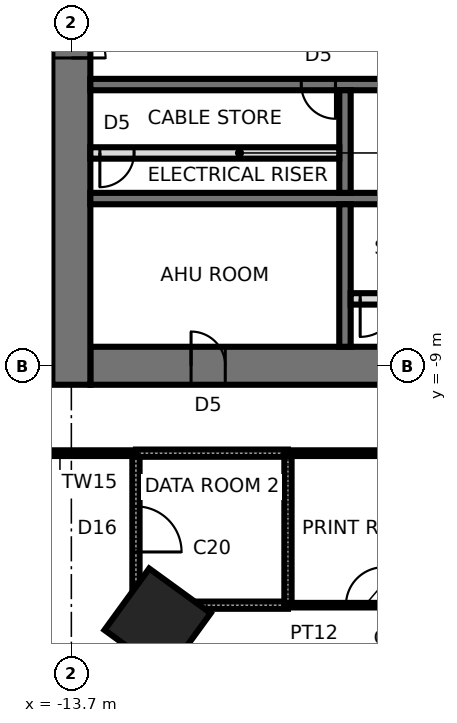
"""IFC4 building model, lengths in metres.
Left out: names, types, materials, properties, quantities, classifications, styles, units other than length and angle.
Written with IfcOpenShell. Run it as: python <this file> out.ifc"""

import sys

from ifc_helpers import new_model, si_unit, direction, frame, frame_2d, origin, origin_2d, place, context, subcontext, project, spatial, rectangle, extrude, element, fill, save


model = new_model("IFC4")
c1 = context("Model", 3, precision=1e-05, world=origin(), true_north=direction((0.0, 1.0)))
c2 = subcontext(c1, "Body", "Model", "MODEL_VIEW")
j1 = project(units=[si_unit("LENGTHUNIT", "METRE"), si_unit("PLANEANGLEUNIT", "RADIAN")], contexts=[c1])
p1 = place(None, origin())
s1 = spatial("IfcSite", under=j1, at=p1, CompositionType="ELEMENT")
p2 = place(p1, origin())
s2 = spatial("IfcBuilding", under=s1, at=p2, CompositionType="ELEMENT")
p3 = place(p2, frame((0.0, 0.0, 32.2)))
s3 = spatial("IfcBuildingStorey", under=s2, at=p3, CompositionType="ELEMENT", Elevation=32.2)
p4 = place(p3, frame((-11.43, -15.733, 0.0), z_axis=(0.0, 0.0, 1.0), x_axis=(-0.587785252292, -0.809016994375, 0.0)))
e1 = element("IfcColumn", 1, at=p4, inside=s3, PredefinedType="COLUMN", context=c2, shape_type="SweptSolid", body=[
    extrude(rectangle(XDim=2.0, YDim=2.0, at=origin_2d()), origin(), (0.0, 0.0, 1.0), 4.2),
])
p5 = place(p3, frame((-13.2, -9.0, 0.0), z_axis=(0.0, 0.0, 1.0), x_axis=(1.0, 0.0, 0.0)))
e2 = element("IfcWall", 2, at=p5, inside=s3, PredefinedType="SHEAR", context=c2, shape_type="SweptSolid", body=[
    extrude(rectangle(XDim=26.4, YDim=1.0, at=frame_2d((13.2, 0.0))), origin(), (0.0, 0.0, 1.0), 4.2),
])
p6 = place(p5, frame((2.65, 0.0, 0.0)))
e3 = element("IfcOpeningElement", 3, at=p6, cuts=e2, PredefinedType="OPENING", context=c2, shape_type="SweptSolid", body=[
    extrude(rectangle(XDim=0.9, YDim=2.1, at=frame_2d((0.45, 1.05))), frame((0.0, 0.51, 0.0), z_axis=(0.0, -1.0, 0.0), x_axis=(1.0, 0.0, 0.0)), (0.0, 0.0, 1.0), 1.02),
])
p7 = place(p5, frame((9.5, 0.0, 0.0)))
e4 = element("IfcOpeningElement", 4, at=p7, cuts=e2, PredefinedType="OPENING", context=c2, shape_type="SweptSolid", body=[
    extrude(rectangle(XDim=0.9, YDim=2.1, at=frame_2d((0.45, 1.05))), frame((0.0, 0.51, 0.0), z_axis=(0.0, -1.0, 0.0), x_axis=(1.0, 0.0, 0.0)), (0.0, 0.0, 1.0), 1.02),
])
p8 = place(p5, frame((16.0, 0.0, 0.0)))
e5 = element("IfcOpeningElement", 5, at=p8, cuts=e2, PredefinedType="OPENING", context=c2, shape_type="SweptSolid", body=[
    extrude(rectangle(XDim=0.9, YDim=2.1, at=frame_2d((0.45, 1.05))), frame((0.0, 0.51, 0.0), z_axis=(0.0, -1.0, 0.0), x_axis=(1.0, 0.0, 0.0)), (0.0, 0.0, 1.0), 1.02),
])
p9 = place(p5, frame((22.85, 0.0, 0.0)))
e6 = element("IfcOpeningElement", 6, at=p9, cuts=e2, PredefinedType="OPENING", context=c2, shape_type="SweptSolid", body=[
    extrude(rectangle(XDim=0.9, YDim=2.1, at=frame_2d((0.45, 1.05))), frame((0.0, 0.51, 0.0), z_axis=(0.0, -1.0, 0.0), x_axis=(1.0, 0.0, 0.0)), (0.0, 0.0, 1.0), 1.02),
])
p10 = place(p3, frame((-13.7, 9.5, 0.0), z_axis=(0.0, 0.0, 1.0), x_axis=(0.0, -1.0, 0.0)))
e7 = element("IfcWall", 7, at=p10, inside=s3, PredefinedType="SHEAR", context=c2, shape_type="SweptSolid", body=[
    extrude(rectangle(XDim=19.0, YDim=1.0, at=frame_2d((9.5, 0.0))), origin(), (0.0, 0.0, 1.0), 4.2),
])
p11 = place(p10, frame((8.6, 0.0, 0.0)))
e8 = element("IfcOpeningElement", 8, at=p11, cuts=e7, PredefinedType="OPENING", context=c2, shape_type="SweptSolid", body=[
    extrude(rectangle(XDim=1.8, YDim=2.4, at=frame_2d((0.9, 1.2))), frame((0.0, 0.51, 0.0), z_axis=(0.0, -1.0, 0.0), x_axis=(1.0, 0.0, 0.0)), (0.0, 0.0, 1.0), 1.02),
])
p12 = place(p3, frame((-13.2, -1.6, 0.0), z_axis=(0.0, 0.0, 1.0), x_axis=(1.0, 0.0, 0.0)))
e9 = element("IfcWall", 9, at=p12, inside=s3, PredefinedType="SHEAR", context=c2, shape_type="SweptSolid", body=[
    extrude(rectangle(XDim=26.4, YDim=0.3, at=frame_2d((13.2, 0.0))), origin(), (0.0, 0.0, 1.0), 4.2),
])
p13 = place(p12, frame((25.15, 0.0, 0.0)))
e10 = element("IfcOpeningElement", 10, at=p13, cuts=e9, PredefinedType="OPENING", context=c2, shape_type="SweptSolid", body=[
    extrude(rectangle(XDim=1.0, YDim=2.1, at=frame_2d((0.5, 1.05))), frame((0.0, 0.16, 0.0), z_axis=(0.0, -1.0, 0.0), x_axis=(1.0, 0.0, 0.0)), (0.0, 0.0, 1.0), 0.32),
])
p14 = place(p12, frame((15.25, 0.0, 0.0)))
e11 = element("IfcOpeningElement", 11, at=p14, cuts=e9, PredefinedType="OPENING", context=c2, shape_type="SweptSolid", body=[
    extrude(rectangle(XDim=1.1, YDim=2.3, at=frame_2d((0.55, 1.15))), frame((0.0, 0.16, 0.0), z_axis=(0.0, -1.0, 0.0), x_axis=(1.0, 0.0, 0.0)), (0.0, 0.0, 1.0), 0.32),
])
p15 = place(p12, frame((17.85, 0.0, 0.0)))
e12 = element("IfcOpeningElement", 12, at=p15, cuts=e9, PredefinedType="OPENING", context=c2, shape_type="SweptSolid", body=[
    extrude(rectangle(XDim=1.1, YDim=2.3, at=frame_2d((0.55, 1.15))), frame((0.0, 0.16, 0.0), z_axis=(0.0, -1.0, 0.0), x_axis=(1.0, 0.0, 0.0)), (0.0, 0.0, 1.0), 0.32),
])
p16 = place(p12, frame((5.55, 0.0, 0.0)))
e13 = element("IfcOpeningElement", 13, at=p16, cuts=e9, PredefinedType="OPENING", context=c2, shape_type="SweptSolid", body=[
    extrude(rectangle(XDim=0.9, YDim=2.1, at=frame_2d((0.45, 1.05))), frame((0.0, 0.16, 0.0), z_axis=(0.0, -1.0, 0.0), x_axis=(1.0, 0.0, 0.0)), (0.0, 0.0, 1.0), 0.32),
])
p17 = place(p3, frame((-13.2, -4.6, 0.0), z_axis=(0.0, 0.0, 1.0), x_axis=(1.0, 0.0, 0.0)))
e14 = element("IfcWall", 14, at=p17, inside=s3, PredefinedType="SHEAR", context=c2, shape_type="SweptSolid", body=[
    extrude(rectangle(XDim=26.4, YDim=0.3, at=frame_2d((13.2, 0.0))), origin(), (0.0, 0.0, 1.0), 4.2),
])
p18 = place(p3, frame((-6.5, -1.75, 0.0), z_axis=(0.0, 0.0, 1.0), x_axis=(0.0, -1.0, 0.0)))
e15 = element("IfcWall", 15, at=p18, inside=s3, PredefinedType="SHEAR", context=c2, shape_type="SweptSolid", body=[
    extrude(rectangle(XDim=2.7, YDim=0.3, at=frame_2d((1.35, 0.0))), origin(), (0.0, 0.0, 1.0), 4.2),
])
p19 = place(p3, frame((-6.5, -4.75, 0.0), z_axis=(0.0, 0.0, 1.0), x_axis=(0.0, -1.0, 0.0)))
e16 = element("IfcWall", 16, at=p19, inside=s3, PredefinedType="SHEAR", context=c2, shape_type="SweptSolid", body=[
    extrude(rectangle(XDim=3.75, YDim=0.3, at=frame_2d((1.875, 0.0))), origin(), (0.0, 0.0, 1.0), 4.2),
])
p20 = place(p3, frame((-6.35, -7.24, 0.0), z_axis=(0.0, 0.0, 1.0), x_axis=(1.0, 0.0, 0.0)))
e17 = element("IfcWall", 17, at=p20, inside=s3, PredefinedType="PARTITIONING", context=c2, shape_type="SweptSolid", body=[
    extrude(rectangle(XDim=6.2, YDim=0.3, at=frame_2d((3.1, 0.0))), origin(), (0.0, 0.0, 1.0), 4.04),
])
p21 = place(p20, frame((0.25, 0.0, 0.0)))
e18 = element("IfcOpeningElement", 18, at=p21, cuts=e17, PredefinedType="OPENING", context=c2, shape_type="SweptSolid", body=[
    extrude(rectangle(XDim=1.0, YDim=2.4, at=frame_2d((0.5, 1.2))), frame((0.0, 0.16, 0.0), z_axis=(0.0, -1.0, 0.0), x_axis=(1.0, 0.0, 0.0)), (0.0, 0.0, 1.0), 0.32),
])
p22 = place(p3, frame((-13.2, -3.4, 0.0), z_axis=(0.0, 0.0, 1.0), x_axis=(1.0, 0.0, 0.0)))
e19 = element("IfcWall", 19, at=p22, inside=s3, PredefinedType="SOLIDWALL", context=c2, shape_type="SweptSolid", body=[
    extrude(rectangle(XDim=6.55, YDim=0.3, at=frame_2d((3.275, 0.0))), origin(), (0.0, 0.0, 1.0), 4.04),
])
p23 = place(p22, frame((0.25, 0.0, 0.0)))
e20 = element("IfcOpeningElement", 20, at=p23, cuts=e19, PredefinedType="OPENING", context=c2, shape_type="SweptSolid", body=[
    extrude(rectangle(XDim=0.9, YDim=2.1, at=frame_2d((0.45, 1.05))), frame((0.0, 0.16, 0.0), z_axis=(0.0, -1.0, 0.0), x_axis=(1.0, 0.0, 0.0)), (0.0, 0.0, 1.0), 0.32),
])
p24 = place(p3, frame((-16.0, -11.3, 0.0), z_axis=(0.0, 0.0, 1.0), x_axis=(1.0, 0.0, 0.0)))
e21 = element("IfcWall", 21, at=p24, inside=s3, PredefinedType="PARTITIONING", context=c2, shape_type="SweptSolid", body=[
    extrude(rectangle(XDim=4.0, YDim=0.15, at=frame_2d((2.0, 0.0))), origin(), (0.0, 0.0, 1.0), 4.04),
])
p25 = place(p3, frame((-12.0, -11.3, 0.0), z_axis=(0.0, 0.0, 1.0), x_axis=(0.0, -1.0, 0.0)))
e22 = element("IfcWall", 22, at=p25, inside=s3, PredefinedType="SOLIDWALL", context=c2, shape_type="SweptSolid", body=[
    extrude(rectangle(XDim=4.0, YDim=0.19, at=frame_2d((2.0, 0.0))), origin(), (0.0, 0.0, 1.0), 4.04),
])
p26 = place(p25, frame((1.4, 0.0, 0.0)))
e23 = element("IfcOpeningElement", 23, at=p26, cuts=e22, PredefinedType="OPENING", context=c2, shape_type="SweptSolid", body=[
    extrude(rectangle(XDim=1.2, YDim=2.1, at=frame_2d((0.6, 1.05))), frame((0.0, 0.105, 0.0), z_axis=(0.0, -1.0, 0.0), x_axis=(1.0, 0.0, 0.0)), (0.0, 0.0, 1.0), 0.21),
])
for number, where, z_axis, x_axis in (
    (24, (-8.0, -11.3, 0.0), (0.0, 0.0, 1.0), (-1.0, 0.0, 0.0)),
    (25, (-12.0, -15.3, 0.0), (0.0, 0.0, 1.0), (1.0, 0.0, 0.0)),
    (26, (-8.0, -11.3, 0.0), (0.0, 0.0, 1.0), (0.0, -1.0, 0.0)),
):
    element("IfcWall", number, at=place(p3, frame(where, z_axis=z_axis, x_axis=x_axis)), inside=s3, PredefinedType="SOLIDWALL", context=c2, shape_type="SweptSolid", body=[
        extrude(rectangle(XDim=4.0, YDim=0.19, at=frame_2d((2.0, 0.0))), origin(), (0.0, 0.0, 1.0), 4.04),
    ])
p27 = place(p3, frame((-8.0, -15.3, 0.0), z_axis=(0.0, 0.0, 1.0), x_axis=(1.0, 0.0, 0.0)))
e27 = element("IfcWall", 27, at=p27, inside=s3, PredefinedType="PARTITIONING", context=c2, shape_type="SweptSolid", body=[
    extrude(rectangle(XDim=4.0, YDim=0.12, at=frame_2d((2.0, 0.0))), origin(), (0.0, 0.0, 1.0), 3.586),
])
p28 = place(p27, frame((1.526, 0.0, 0.0)))
e28 = element("IfcOpeningElement", 28, at=p28, cuts=e27, PredefinedType="OPENING", context=c2, shape_type="SweptSolid", body=[
    extrude(rectangle(XDim=1.0, YDim=2.4, at=frame_2d((0.5, 1.2))), frame((0.0, 0.07, 0.0), z_axis=(0.0, -1.0, 0.0), x_axis=(1.0, 0.0, 0.0)), (0.0, 0.0, 1.0), 0.14),
])
p29 = place(p3, frame((-8.0, -11.3, 0.0), z_axis=(0.0, 0.0, 1.0), x_axis=(1.0, 0.0, 0.0)))
e29 = element("IfcWall", 29, at=p29, inside=s3, PredefinedType="PARTITIONING", context=c2, shape_type="SweptSolid", body=[
    extrude(rectangle(XDim=24.0, YDim=0.15, at=frame_2d((12.0, 0.0))), origin(), (0.0, 0.0, 1.0), 4.04),
])
p30 = place(p11, origin())
e30 = element("IfcDoor", 30, at=p30, inside=s3, OperationType="DOUBLE_DOOR_SINGLE_SWING", PredefinedType="DOOR", context=c2, shape_type="SweptSolid", body=[
    extrude(rectangle(XDim=1.72, YDim=2.36, at=frame_2d((0.9, 1.18))), frame((0.0, 0.025, 0.0), z_axis=(0.0, -1.0, 0.0), x_axis=(1.0, 0.0, 0.0)), (0.0, 0.0, 1.0), 0.05),
    extrude(rectangle(XDim=0.04, YDim=2.4, at=frame_2d((0.02, 1.2))), frame((0.0, 0.25, 0.0), z_axis=(0.0, -1.0, 0.0), x_axis=(1.0, 0.0, 0.0)), (0.0, 0.0, 1.0), 0.5),
    extrude(rectangle(XDim=0.04, YDim=2.4, at=frame_2d((1.78, 1.2))), frame((0.0, 0.25, 0.0), z_axis=(0.0, -1.0, 0.0), x_axis=(1.0, 0.0, 0.0)), (0.0, 0.0, 1.0), 0.5),
    extrude(rectangle(XDim=1.72, YDim=0.04, at=frame_2d((0.9, 2.38))), frame((0.0, 0.25, 0.0), z_axis=(0.0, -1.0, 0.0), x_axis=(1.0, 0.0, 0.0)), (0.0, 0.0, 1.0), 0.5),
])
fill(e8, e30)
p31 = place(p16, frame((0.9, 0.0, 0.0), z_axis=(0.0, 0.0, 1.0), x_axis=(-1.0, 0.0, 0.0)))
e31 = element("IfcDoor", 31, at=p31, inside=s3, OperationType="SINGLE_SWING_LEFT", PredefinedType="DOOR", context=c2, shape_type="SweptSolid", body=[
    extrude(rectangle(XDim=0.9, YDim=2.1, at=frame_2d((0.45, 1.05))), frame((0.0, 0.025, 0.0), z_axis=(0.0, -1.0, 0.0), x_axis=(1.0, 0.0, 0.0)), (0.0, 0.0, 1.0), 0.05),
])
fill(e13, e31)
p32 = place(p6, origin())
e32 = element("IfcDoor", 32, at=p32, inside=s3, OperationType="SINGLE_SWING_LEFT", PredefinedType="DOOR", context=c2, shape_type="SweptSolid", body=[
    extrude(rectangle(XDim=0.82, YDim=2.06, at=frame_2d((0.45, 1.03))), frame((0.0, 0.025, 0.0), z_axis=(0.0, -1.0, 0.0), x_axis=(1.0, 0.0, 0.0)), (0.0, 0.0, 1.0), 0.05),
    extrude(rectangle(XDim=0.04, YDim=2.1, at=frame_2d((0.02, 1.05))), frame((0.0, 0.25, 0.0), z_axis=(0.0, -1.0, 0.0), x_axis=(1.0, 0.0, 0.0)), (0.0, 0.0, 1.0), 0.5),
    extrude(rectangle(XDim=0.04, YDim=2.1, at=frame_2d((0.88, 1.05))), frame((0.0, 0.25, 0.0), z_axis=(0.0, -1.0, 0.0), x_axis=(1.0, 0.0, 0.0)), (0.0, 0.0, 1.0), 0.5),
    extrude(rectangle(XDim=0.82, YDim=0.04, at=frame_2d((0.45, 2.08))), frame((0.0, 0.25, 0.0), z_axis=(0.0, -1.0, 0.0), x_axis=(1.0, 0.0, 0.0)), (0.0, 0.0, 1.0), 0.5),
])
fill(e3, e32)
p33 = place(p21, frame((1.0, 0.0, 0.0), z_axis=(0.0, 0.0, 1.0), x_axis=(-1.0, 0.0, 0.0)))
e33 = element("IfcDoor", 33, at=p33, inside=s3, OperationType="SINGLE_SWING_RIGHT", PredefinedType="DOOR", context=c2, shape_type="SweptSolid", body=[
    extrude(rectangle(XDim=1.0, YDim=2.4, at=frame_2d((0.5, 1.2))), frame((0.0, 0.025, 0.0), z_axis=(0.0, -1.0, 0.0), x_axis=(1.0, 0.0, 0.0)), (0.0, 0.0, 1.0), 0.05),
])
fill(e18, e33)
p34 = place(p23, frame((0.9, 0.0, 0.0), z_axis=(0.0, 0.0, 1.0), x_axis=(-1.0, 0.0, 0.0)))
e34 = element("IfcDoor", 34, at=p34, inside=s3, OperationType="SINGLE_SWING_RIGHT", PredefinedType="DOOR", context=c2, shape_type="SweptSolid", body=[
    extrude(rectangle(XDim=0.9, YDim=2.1, at=frame_2d((0.45, 1.05))), frame((0.0, 0.025, 0.0), z_axis=(0.0, -1.0, 0.0), x_axis=(1.0, 0.0, 0.0)), (0.0, 0.0, 1.0), 0.05),
])
fill(e20, e34)
p35 = place(p26, origin())
e35 = element("IfcDoor", 35, at=p35, inside=s3, OperationType="SINGLE_SWING_RIGHT", PredefinedType="DOOR", context=c2, shape_type="SweptSolid", body=[
    extrude(rectangle(XDim=1.2, YDim=2.1, at=frame_2d((0.6, 1.05))), frame((0.0, 0.025, 0.0), z_axis=(0.0, -1.0, 0.0), x_axis=(1.0, 0.0, 0.0)), (0.0, 0.0, 1.0), 0.05),
])
fill(e23, e35)
p36 = place(p28, origin())
e36 = element("IfcDoor", 36, at=p36, inside=s3, OperationType="SINGLE_SWING_RIGHT", PredefinedType="DOOR", context=c2, shape_type="SweptSolid", body=[
    extrude(rectangle(XDim=1.0, YDim=2.4, at=frame_2d((0.5, 1.2))), frame((0.0, 0.025, 0.0), z_axis=(0.0, -1.0, 0.0), x_axis=(1.0, 0.0, 0.0)), (0.0, 0.0, 1.0), 0.05),
])
fill(e28, e36)
save(model, sys.argv[1])
